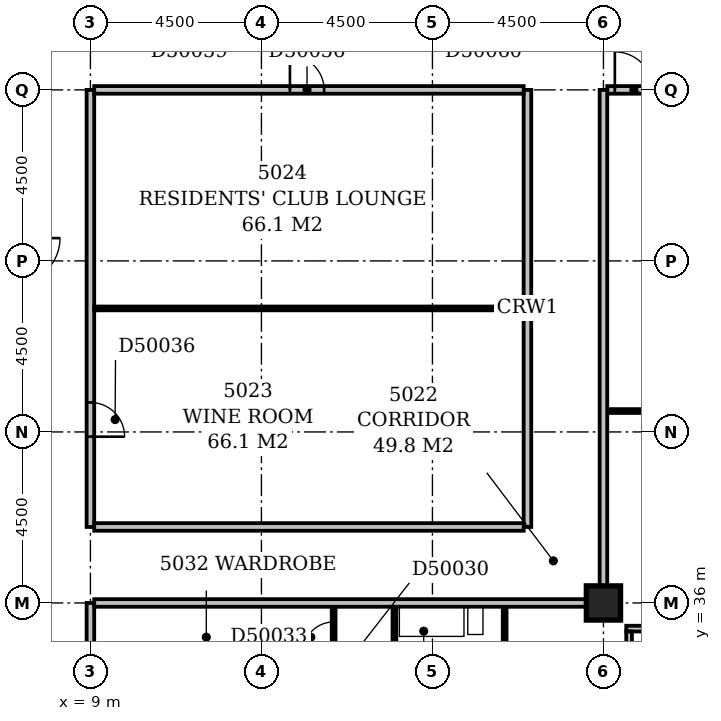
"""IFC4 building model, lengths in metres.
Left out: names, types, materials, properties, quantities, classifications, styles, units other than length and angle.
Written with IfcOpenShell. Run it as: python <this file> out.ifc"""

import sys

from ifc_helpers import new_model, si_unit, direction, frame, frame_2d, origin, origin_2d, place, context, subcontext, project, spatial, rectangle, extrude, element, fill, save


model = new_model("IFC4")
c1 = context("Model", 3, precision=1e-05, world=origin(), true_north=direction((0.0, 1.0)))
c2 = subcontext(c1, "Body", "Model", "MODEL_VIEW")
j1 = project(units=[si_unit("LENGTHUNIT", "METRE"), si_unit("PLANEANGLEUNIT", "RADIAN")], contexts=[c1])
p1 = place(None, origin())
s1 = spatial("IfcSite", under=j1, at=p1, CompositionType="ELEMENT")
p2 = place(p1, origin())
s2 = spatial("IfcBuilding", under=s1, at=p2, CompositionType="ELEMENT")
p3 = place(p2, frame((0.0, 0.0, 197.0)))
s3 = spatial("IfcBuildingStorey", under=s2, at=p3, CompositionType="ELEMENT", Elevation=197.0)
p4 = place(p3, frame((22.5, 36.0, -0.3), z_axis=(0.0, 0.0, 1.0), x_axis=(1.0, 0.0, 0.0)))
e1 = element("IfcColumn", 1, at=p4, inside=s3, PredefinedType="COLUMN", context=c2, shape_type="SweptSolid", body=[
    extrude(rectangle(XDim=0.9, YDim=0.9, at=origin_2d()), origin(), (0.0, 0.0, 1.0), 3.6),
])
p5 = place(p3, frame((23.175, 17.4, 0.0), z_axis=(0.0, 0.0, 1.0), x_axis=(0.0, 1.0, 0.0)))
e2 = element("IfcWall", 2, at=p5, inside=s3, PredefinedType="STANDARD", context=c2, shape_type="SweptSolid", body=[
    extrude(rectangle(XDim=17.85, YDim=0.15, at=frame_2d((8.925, 0.0))), origin(), (0.0, 0.0, 1.0), 2.7),
])
p6 = place(p5, frame((1.65, 0.0, 0.6)))
e3 = element("IfcOpeningElement", 3, at=p6, cuts=e2, PredefinedType="OPENING", context=c2, shape_type="SweptSolid", body=[
    extrude(rectangle(XDim=2.4, YDim=1.8, at=frame_2d((1.2, 0.9))), frame((0.0, 0.087, 0.0), z_axis=(0.0, -1.0, 0.0), x_axis=(1.0, 0.0, 0.0)), (0.0, 0.0, 1.0), 0.174),
])
p7 = place(p5, frame((5.885, 0.0, 0.6)))
e4 = element("IfcOpeningElement", 4, at=p7, cuts=e2, PredefinedType="OPENING", context=c2, shape_type="SweptSolid", body=[
    extrude(rectangle(XDim=2.4, YDim=1.8, at=frame_2d((1.2, 0.9))), frame((0.0, 0.087, 0.0), z_axis=(0.0, -1.0, 0.0), x_axis=(1.0, 0.0, 0.0)), (0.0, 0.0, 1.0), 0.174),
])
p8 = place(p5, frame((10.65, 0.0, 0.6)))
e5 = element("IfcOpeningElement", 5, at=p8, cuts=e2, PredefinedType="OPENING", context=c2, shape_type="SweptSolid", body=[
    extrude(rectangle(XDim=2.4, YDim=1.8, at=frame_2d((1.2, 0.9))), frame((0.0, 0.087, 0.0), z_axis=(0.0, -1.0, 0.0), x_axis=(1.0, 0.0, 0.0)), (0.0, 0.0, 1.0), 0.174),
])
p9 = place(p5, frame((15.15, 0.0, 0.6)))
e6 = element("IfcOpeningElement", 6, at=p9, cuts=e2, PredefinedType="OPENING", context=c2, shape_type="SweptSolid", body=[
    extrude(rectangle(XDim=2.4, YDim=1.8, at=frame_2d((1.2, 0.9))), frame((0.0, 0.087, 0.0), z_axis=(0.0, -1.0, 0.0), x_axis=(1.0, 0.0, 0.0)), (0.0, 0.0, 1.0), 0.174),
])
p10 = place(p3, frame((23.1, 35.325, 0.0), z_axis=(0.0, 0.0, 1.0), x_axis=(1.0, 0.0, 0.0)))
e7 = element("IfcWall", 7, at=p10, inside=s3, PredefinedType="STANDARD", context=c2, shape_type="SweptSolid", body=[
    extrude(rectangle(XDim=27.15, YDim=0.15, at=frame_2d((13.575, 0.0))), origin(), (0.0, 0.0, 1.0), 2.7),
])
p11 = place(p10, frame((0.45, 0.0, 0.6)))
e8 = element("IfcOpeningElement", 8, at=p11, cuts=e7, PredefinedType="OPENING", context=c2, shape_type="SweptSolid", body=[
    extrude(rectangle(XDim=2.4, YDim=1.8, at=frame_2d((1.2, 0.9))), frame((0.0, 0.087, 0.0), z_axis=(0.0, -1.0, 0.0), x_axis=(1.0, 0.0, 0.0)), (0.0, 0.0, 1.0), 0.174),
])
p12 = place(p10, frame((4.552, 0.0, 0.6)))
e9 = element("IfcOpeningElement", 9, at=p12, cuts=e7, PredefinedType="OPENING", context=c2, shape_type="SweptSolid", body=[
    extrude(rectangle(XDim=1.5, YDim=1.8, at=frame_2d((0.75, 0.9))), frame((0.0, 0.087, 0.0), z_axis=(0.0, -1.0, 0.0), x_axis=(1.0, 0.0, 0.0)), (0.0, 0.0, 1.0), 0.174),
])
p13 = place(p10, frame((9.45, 0.0, 0.6)))
e10 = element("IfcOpeningElement", 10, at=p13, cuts=e7, PredefinedType="OPENING", context=c2, shape_type="SweptSolid", body=[
    extrude(rectangle(XDim=2.4, YDim=1.8, at=frame_2d((1.2, 0.9))), frame((0.0, 0.087, 0.0), z_axis=(0.0, -1.0, 0.0), x_axis=(1.0, 0.0, 0.0)), (0.0, 0.0, 1.0), 0.174),
])
p14 = place(p10, frame((13.95, 0.0, 0.6)))
e11 = element("IfcOpeningElement", 11, at=p14, cuts=e7, PredefinedType="OPENING", context=c2, shape_type="SweptSolid", body=[
    extrude(rectangle(XDim=2.4, YDim=1.8, at=frame_2d((1.2, 0.9))), frame((0.0, 0.087, 0.0), z_axis=(0.0, -1.0, 0.0), x_axis=(1.0, 0.0, 0.0)), (0.0, 0.0, 1.0), 0.174),
])
p15 = place(p10, frame((18.088, 0.0, 0.6)))
e12 = element("IfcOpeningElement", 12, at=p15, cuts=e7, PredefinedType="OPENING", context=c2, shape_type="SweptSolid", body=[
    extrude(rectangle(XDim=0.6, YDim=1.8, at=frame_2d((0.3, 0.9))), frame((0.0, 0.087, 0.0), z_axis=(0.0, -1.0, 0.0), x_axis=(1.0, 0.0, 0.0)), (0.0, 0.0, 1.0), 0.174),
])
p16 = place(p10, frame((20.301, 0.0, 0.6)))
e13 = element("IfcOpeningElement", 13, at=p16, cuts=e7, PredefinedType="OPENING", context=c2, shape_type="SweptSolid", body=[
    extrude(rectangle(XDim=0.9, YDim=1.8, at=frame_2d((0.45, 0.9))), frame((0.0, 0.087, 0.0), z_axis=(0.0, -1.0, 0.0), x_axis=(1.0, 0.0, 0.0)), (0.0, 0.0, 1.0), 0.174),
])
p17 = place(p10, frame((22.95, 0.0, 0.6)))
e14 = element("IfcOpeningElement", 14, at=p17, cuts=e7, PredefinedType="OPENING", context=c2, shape_type="SweptSolid", body=[
    extrude(rectangle(XDim=2.4, YDim=1.8, at=frame_2d((1.2, 0.9))), frame((0.0, 0.087, 0.0), z_axis=(0.0, -1.0, 0.0), x_axis=(1.0, 0.0, 0.0)), (0.0, 0.0, 1.0), 0.174),
])
p18 = place(p3, frame((9.0, 5.0, 0.0), z_axis=(0.0, 0.0, 1.0), x_axis=(0.0, 1.0, 0.0)))
e15 = element("IfcWall", 15, at=p18, inside=s3, PredefinedType="PARTITIONING", context=c2, shape_type="SweptSolid", body=[
    extrude(rectangle(XDim=31.0, YDim=0.2, at=frame_2d((15.5, 0.0))), origin(), (0.0, 0.0, 1.0), 3.3),
])
p19 = place(p18, frame((18.4, 0.0, 0.0)))
e16 = element("IfcOpeningElement", 16, at=p19, cuts=e15, PredefinedType="OPENING", context=c2, shape_type="SweptSolid", body=[
    extrude(rectangle(XDim=1.0, YDim=2.1, at=frame_2d((0.5, 1.05))), frame((0.0, 0.112, 0.0), z_axis=(0.0, -1.0, 0.0), x_axis=(1.0, 0.0, 0.0)), (0.0, 0.0, 1.0), 0.224),
])
p20 = place(p18, frame((11.7, 0.0, 0.0)))
e17 = element("IfcOpeningElement", 17, at=p20, cuts=e15, PredefinedType="OPENING", context=c2, shape_type="SweptSolid", body=[
    extrude(rectangle(XDim=1.0, YDim=2.1, at=frame_2d((0.5, 1.05))), frame((0.0, 0.112, 0.0), z_axis=(0.0, -1.0, 0.0), x_axis=(1.0, 0.0, 0.0)), (0.0, 0.0, 1.0), 0.224),
])
p21 = place(p18, frame((1.5, 0.0, 0.0)))
e18 = element("IfcOpeningElement", 18, at=p21, cuts=e15, PredefinedType="OPENING", context=c2, shape_type="SweptSolid", body=[
    extrude(rectangle(XDim=0.9, YDim=2.1, at=frame_2d((0.45, 1.05))), frame((0.0, 0.112, 0.0), z_axis=(0.0, -1.0, 0.0), x_axis=(1.0, 0.0, 0.0)), (0.0, 0.0, 1.0), 0.224),
])
p22 = place(p3, frame((17.0, 18.1, 0.0), z_axis=(0.0, 0.0, 1.0), x_axis=(0.0, 1.0, 0.0)))
e19 = element("IfcWall", 19, at=p22, inside=s3, PredefinedType="PARTITIONING", context=c2, shape_type="SweptSolid", body=[
    extrude(rectangle(XDim=17.8, YDim=0.1, at=frame_2d((8.9, 0.0))), origin(), (0.0, 0.0, 1.0), 3.3),
])
p23 = place(p22, frame((2.85, 0.0, 0.0)))
e20 = element("IfcOpeningElement", 20, at=p23, cuts=e19, PredefinedType="OPENING", context=c2, shape_type="SweptSolid", body=[
    extrude(rectangle(XDim=0.9, YDim=2.1, at=frame_2d((0.45, 1.05))), frame((0.0, 0.062, 0.0), z_axis=(0.0, -1.0, 0.0), x_axis=(1.0, 0.0, 0.0)), (0.0, 0.0, 1.0), 0.124),
])
p24 = place(p22, frame((8.4, 0.0, 0.0)))
e21 = element("IfcOpeningElement", 21, at=p24, cuts=e19, PredefinedType="OPENING", context=c2, shape_type="SweptSolid", body=[
    extrude(rectangle(XDim=0.9, YDim=2.1, at=frame_2d((0.45, 1.05))), frame((0.0, 0.062, 0.0), z_axis=(0.0, -1.0, 0.0), x_axis=(1.0, 0.0, 0.0)), (0.0, 0.0, 1.0), 0.124),
])
p25 = place(p22, frame((14.05, 0.0, 0.0)))
e22 = element("IfcOpeningElement", 22, at=p25, cuts=e19, PredefinedType="OPENING", context=c2, shape_type="SweptSolid", body=[
    extrude(rectangle(XDim=0.9, YDim=2.1, at=frame_2d((0.45, 1.05))), frame((0.0, 0.062, 0.0), z_axis=(0.0, -1.0, 0.0), x_axis=(1.0, 0.0, 0.0)), (0.0, 0.0, 1.0), 0.124),
])
p26 = place(p3, frame((15.4, 24.7, 0.0), z_axis=(0.0, 0.0, 1.0), x_axis=(0.0, 1.0, 0.0)))
e23 = element("IfcWall", 23, at=p26, inside=s3, PredefinedType="PARTITIONING", context=c2, shape_type="SweptSolid", body=[
    extrude(rectangle(XDim=11.2, YDim=0.1, at=frame_2d((5.6, 0.0))), origin(), (0.0, 0.0, 1.0), 3.3),
])
p27 = place(p26, frame((0.8, 0.0, 0.0)))
e24 = element("IfcOpeningElement", 24, at=p27, cuts=e23, PredefinedType="OPENING", context=c2, shape_type="SweptSolid", body=[
    extrude(rectangle(XDim=0.8, YDim=2.1, at=frame_2d((0.4, 1.05))), frame((0.0, 0.062, 0.0), z_axis=(0.0, -1.0, 0.0), x_axis=(1.0, 0.0, 0.0)), (0.0, 0.0, 1.0), 0.124),
])
p28 = place(p26, frame((8.1, 0.0, 0.0)))
e25 = element("IfcOpeningElement", 25, at=p28, cuts=e23, PredefinedType="OPENING", context=c2, shape_type="SweptSolid", body=[
    extrude(rectangle(XDim=0.8, YDim=2.1, at=frame_2d((0.4, 1.05))), frame((0.0, 0.062, 0.0), z_axis=(0.0, -1.0, 0.0), x_axis=(1.0, 0.0, 0.0)), (0.0, 0.0, 1.0), 0.124),
])
p29 = place(p26, frame((4.3, 0.0, 0.0)))
e26 = element("IfcOpeningElement", 26, at=p29, cuts=e23, PredefinedType="OPENING", context=c2, shape_type="SweptSolid", body=[
    extrude(rectangle(XDim=0.8, YDim=2.1, at=frame_2d((0.4, 1.05))), frame((0.0, 0.062, 0.0), z_axis=(0.0, -1.0, 0.0), x_axis=(1.0, 0.0, 0.0)), (0.0, 0.0, 1.0), 0.124),
])
p30 = place(p26, frame((6.1, 0.0, 0.0)))
e27 = element("IfcOpeningElement", 27, at=p30, cuts=e23, PredefinedType="OPENING", context=c2, shape_type="SweptSolid", body=[
    extrude(rectangle(XDim=0.8, YDim=2.1, at=frame_2d((0.4, 1.05))), frame((0.0, 0.062, 0.0), z_axis=(0.0, -1.0, 0.0), x_axis=(1.0, 0.0, 0.0)), (0.0, 0.0, 1.0), 0.124),
])
p31 = place(p26, frame((10.0, 0.0, 0.0)))
e28 = element("IfcOpeningElement", 28, at=p31, cuts=e23, PredefinedType="OPENING", context=c2, shape_type="SweptSolid", body=[
    extrude(rectangle(XDim=0.8, YDim=2.1, at=frame_2d((0.4, 1.05))), frame((0.0, 0.062, 0.0), z_axis=(0.0, -1.0, 0.0), x_axis=(1.0, 0.0, 0.0)), (0.0, 0.0, 1.0), 0.124),
])
p32 = place(p26, frame((2.75, 0.0, 0.0)))
e29 = element("IfcOpeningElement", 29, at=p32, cuts=e23, PredefinedType="OPENING", context=c2, shape_type="SweptSolid", body=[
    extrude(rectangle(XDim=0.8, YDim=2.1, at=frame_2d((0.4, 1.05))), frame((0.0, 0.062, 0.0), z_axis=(0.0, -1.0, 0.0), x_axis=(1.0, 0.0, 0.0)), (0.0, 0.0, 1.0), 0.124),
])
p33 = place(p3, frame((19.9, 33.7, 0.0), z_axis=(0.0, 0.0, 1.0), x_axis=(0.0, 1.0, 0.0)))
e30 = element("IfcWall", 30, at=p33, inside=s3, PredefinedType="PLUMBINGWALL", context=c2, shape_type="SweptSolid", body=[
    extrude(rectangle(XDim=2.2, YDim=0.1, at=frame_2d((1.1, 0.0))), origin(), (0.0, 0.0, 1.0), 3.3),
])
p34 = place(p3, frame((9.1, 36.0, 0.0), z_axis=(0.0, 0.0, 1.0), x_axis=(1.0, 0.0, 0.0)))
e31 = element("IfcWall", 31, at=p34, inside=s3, PredefinedType="PARTITIONING", context=c2, shape_type="SweptSolid", body=[
    extrude(rectangle(XDim=12.95, YDim=0.2, at=frame_2d((6.475, 0.0))), origin(), (0.0, 0.0, 1.0), 3.3),
])
p35 = place(p3, frame((22.5, 36.45, 0.0), z_axis=(0.0, 0.0, 1.0), x_axis=(0.0, 1.0, 0.0)))
e32 = element("IfcWall", 32, at=p35, inside=s3, PredefinedType="PARTITIONING", context=c2, shape_type="SweptSolid", body=[
    extrude(rectangle(XDim=13.05, YDim=0.2, at=frame_2d((6.525, 0.0))), origin(), (0.0, 0.0, 1.0), 3.3),
])
p36 = place(p3, frame((9.0, 38.0, 0.0), z_axis=(0.0, 0.0, 1.0), x_axis=(0.0, 1.0, 0.0)))
e33 = element("IfcWall", 33, at=p36, inside=s3, PredefinedType="PARTITIONING", context=c2, shape_type="SweptSolid", body=[
    extrude(rectangle(XDim=11.5, YDim=0.2, at=frame_2d((5.75, 0.0))), origin(), (0.0, 0.0, 1.0), 3.3),
])
p37 = place(p36, frame((2.375, 0.0, 0.0)))
e34 = element("IfcOpeningElement", 34, at=p37, cuts=e33, PredefinedType="OPENING", context=c2, shape_type="SweptSolid", body=[
    extrude(rectangle(XDim=0.9, YDim=2.1, at=frame_2d((0.45, 1.05))), frame((0.0, 0.112, 0.0), z_axis=(0.0, -1.0, 0.0), x_axis=(1.0, 0.0, 0.0)), (0.0, 0.0, 1.0), 0.224),
])
p38 = place(p3, frame((9.1, 38.0, 0.0), z_axis=(0.0, 0.0, 1.0), x_axis=(1.0, 0.0, 0.0)))
e35 = element("IfcWall", 35, at=p38, inside=s3, PredefinedType="PARTITIONING", context=c2, shape_type="SweptSolid", body=[
    extrude(rectangle(XDim=11.3, YDim=0.2, at=frame_2d((5.65, 0.0))), origin(), (0.0, 0.0, 1.0), 3.3),
])
p39 = place(p3, frame((20.5, 38.0, 0.0), z_axis=(0.0, 0.0, 1.0), x_axis=(0.0, 1.0, 0.0)))
e36 = element("IfcWall", 36, at=p39, inside=s3, PredefinedType="PARTITIONING", context=c2, shape_type="SweptSolid", body=[
    extrude(rectangle(XDim=11.5, YDim=0.2, at=frame_2d((5.75, 0.0))), origin(), (0.0, 0.0, 1.0), 3.3),
])
p40 = place(p3, frame((22.6, 41.05, 0.0), z_axis=(0.0, 0.0, 1.0), x_axis=(1.0, 0.0, 0.0)))
e37 = element("IfcWall", 37, at=p40, inside=s3, PredefinedType="PARTITIONING", context=c2, shape_type="SweptSolid", body=[
    extrude(rectangle(XDim=22.3, YDim=0.1, at=frame_2d((11.15, 0.0))), origin(), (0.0, 0.0, 1.0), 3.3),
])
p41 = place(p40, frame((3.9, 0.0, 0.0)))
e38 = element("IfcOpeningElement", 38, at=p41, cuts=e37, PredefinedType="OPENING", context=c2, shape_type="SweptSolid", body=[
    extrude(rectangle(XDim=0.9, YDim=2.1, at=frame_2d((0.45, 1.05))), frame((0.0, 0.062, 0.0), z_axis=(0.0, -1.0, 0.0), x_axis=(1.0, 0.0, 0.0)), (0.0, 0.0, 1.0), 0.124),
])
p42 = place(p40, frame((9.55, 0.0, 0.0)))
e39 = element("IfcOpeningElement", 39, at=p42, cuts=e37, PredefinedType="OPENING", context=c2, shape_type="SweptSolid", body=[
    extrude(rectangle(XDim=0.9, YDim=2.1, at=frame_2d((0.45, 1.05))), frame((0.0, 0.062, 0.0), z_axis=(0.0, -1.0, 0.0), x_axis=(1.0, 0.0, 0.0)), (0.0, 0.0, 1.0), 0.124),
])
p43 = place(p40, frame((16.35, 0.0, 0.0)))
e40 = element("IfcOpeningElement", 40, at=p43, cuts=e37, PredefinedType="OPENING", context=c2, shape_type="SweptSolid", body=[
    extrude(rectangle(XDim=0.9, YDim=2.1, at=frame_2d((0.45, 1.05))), frame((0.0, 0.062, 0.0), z_axis=(0.0, -1.0, 0.0), x_axis=(1.0, 0.0, 0.0)), (0.0, 0.0, 1.0), 0.124),
])
p44 = place(p40, frame((19.7, 0.0, 0.0)))
e41 = element("IfcOpeningElement", 41, at=p44, cuts=e37, PredefinedType="OPENING", context=c2, shape_type="SweptSolid", body=[
    extrude(rectangle(XDim=0.9, YDim=2.1, at=frame_2d((0.45, 1.05))), frame((0.0, 0.062, 0.0), z_axis=(0.0, -1.0, 0.0), x_axis=(1.0, 0.0, 0.0)), (0.0, 0.0, 1.0), 0.124),
])
p45 = place(p3, frame((9.1, 43.75, 0.0), z_axis=(0.0, 0.0, 1.0), x_axis=(1.0, 0.0, 0.0)))
e42 = element("IfcWall", 42, at=p45, inside=s3, PredefinedType="PARTITIONING", context=c2, shape_type="SweptSolid", body=[
    extrude(rectangle(XDim=11.3, YDim=0.1, at=frame_2d((5.65, 0.0))), origin(), (0.0, 0.0, 1.0), 3.3),
])
p46 = place(p3, frame((9.1, 49.5, 0.0), z_axis=(0.0, 0.0, 1.0), x_axis=(1.0, 0.0, 0.0)))
e43 = element("IfcWall", 43, at=p46, inside=s3, PredefinedType="PARTITIONING", context=c2, shape_type="SweptSolid", body=[
    extrude(rectangle(XDim=11.3, YDim=0.2, at=frame_2d((5.65, 0.0))), origin(), (0.0, 0.0, 1.0), 3.3),
])
p47 = place(p46, frame((5.15, 0.0, 0.0)))
e44 = element("IfcOpeningElement", 44, at=p47, cuts=e43, PredefinedType="OPENING", context=c2, shape_type="SweptSolid", body=[
    extrude(rectangle(XDim=0.9, YDim=2.1, at=frame_2d((0.45, 1.05))), frame((0.0, 0.112, 0.0), z_axis=(0.0, -1.0, 0.0), x_axis=(1.0, 0.0, 0.0)), (0.0, 0.0, 1.0), 0.224),
])
p48 = place(p3, frame((22.6, 49.5, 0.0), z_axis=(0.0, 0.0, 1.0), x_axis=(1.0, 0.0, 0.0)))
e45 = element("IfcWall", 45, at=p48, inside=s3, PredefinedType="PARTITIONING", context=c2, shape_type="SweptSolid", body=[
    extrude(rectangle(XDim=30.95, YDim=0.2, at=frame_2d((15.475, 0.0))), origin(), (0.0, 0.0, 1.0), 3.3),
])
p49 = place(p48, frame((0.2, 0.0, 0.0)))
e46 = element("IfcOpeningElement", 46, at=p49, cuts=e45, PredefinedType="OPENING", context=c2, shape_type="SweptSolid", body=[
    extrude(rectangle(XDim=1.0, YDim=2.1, at=frame_2d((0.5, 1.05))), frame((0.0, 0.112, 0.0), z_axis=(0.0, -1.0, 0.0), x_axis=(1.0, 0.0, 0.0)), (0.0, 0.0, 1.0), 0.224),
])
p50 = place(p48, frame((22.7, 0.0, 0.0)))
e47 = element("IfcOpeningElement", 47, at=p50, cuts=e45, PredefinedType="OPENING", context=c2, shape_type="SweptSolid", body=[
    extrude(rectangle(XDim=1.0, YDim=2.1, at=frame_2d((0.5, 1.05))), frame((0.0, 0.112, 0.0), z_axis=(0.0, -1.0, 0.0), x_axis=(1.0, 0.0, 0.0)), (0.0, 0.0, 1.0), 0.224),
])
p51 = place(p31, origin())
e48 = element("IfcDoor", 48, at=p51, inside=s3, OperationType="SINGLE_SWING_LEFT", PredefinedType="DOOR", context=c2, shape_type="SweptSolid", body=[
    extrude(rectangle(XDim=0.8, YDim=2.1, at=frame_2d((0.4, 1.05))), frame((0.0, 0.025, 0.0), z_axis=(0.0, -1.0, 0.0), x_axis=(1.0, 0.0, 0.0)), (0.0, 0.0, 1.0), 0.05),
])
fill(e28, e48)
p52 = place(p37, frame((0.9, 0.0, 0.0), z_axis=(0.0, 0.0, 1.0), x_axis=(-1.0, 0.0, 0.0)))
e49 = element("IfcDoor", 49, at=p52, inside=s3, OperationType="SINGLE_SWING_RIGHT", PredefinedType="DOOR", context=c2, shape_type="SweptSolid", body=[
    extrude(rectangle(XDim=0.9, YDim=2.1, at=frame_2d((0.45, 1.05))), frame((0.0, 0.025, 0.0), z_axis=(0.0, -1.0, 0.0), x_axis=(1.0, 0.0, 0.0)), (0.0, 0.0, 1.0), 0.05),
])
fill(e34, e49)
p53 = place(p47, origin())
e50 = element("IfcDoor", 50, at=p53, inside=s3, OperationType="SINGLE_SWING_LEFT", PredefinedType="DOOR", context=c2, shape_type="SweptSolid", body=[
    extrude(rectangle(XDim=0.9, YDim=2.1, at=frame_2d((0.45, 1.05))), frame((0.0, 0.025, 0.0), z_axis=(0.0, -1.0, 0.0), x_axis=(1.0, 0.0, 0.0)), (0.0, 0.0, 1.0), 0.05),
])
fill(e44, e50)
p54 = place(p49, origin())
e51 = element("IfcDoor", 51, at=p54, inside=s3, OperationType="SINGLE_SWING_LEFT", PredefinedType="DOOR", context=c2, shape_type="SweptSolid", body=[
    extrude(rectangle(XDim=1.0, YDim=2.1, at=frame_2d((0.5, 1.05))), frame((0.0, 0.025, 0.0), z_axis=(0.0, -1.0, 0.0), x_axis=(1.0, 0.0, 0.0)), (0.0, 0.0, 1.0), 0.05),
])
fill(e46, e51)
save(model, sys.argv[1])
